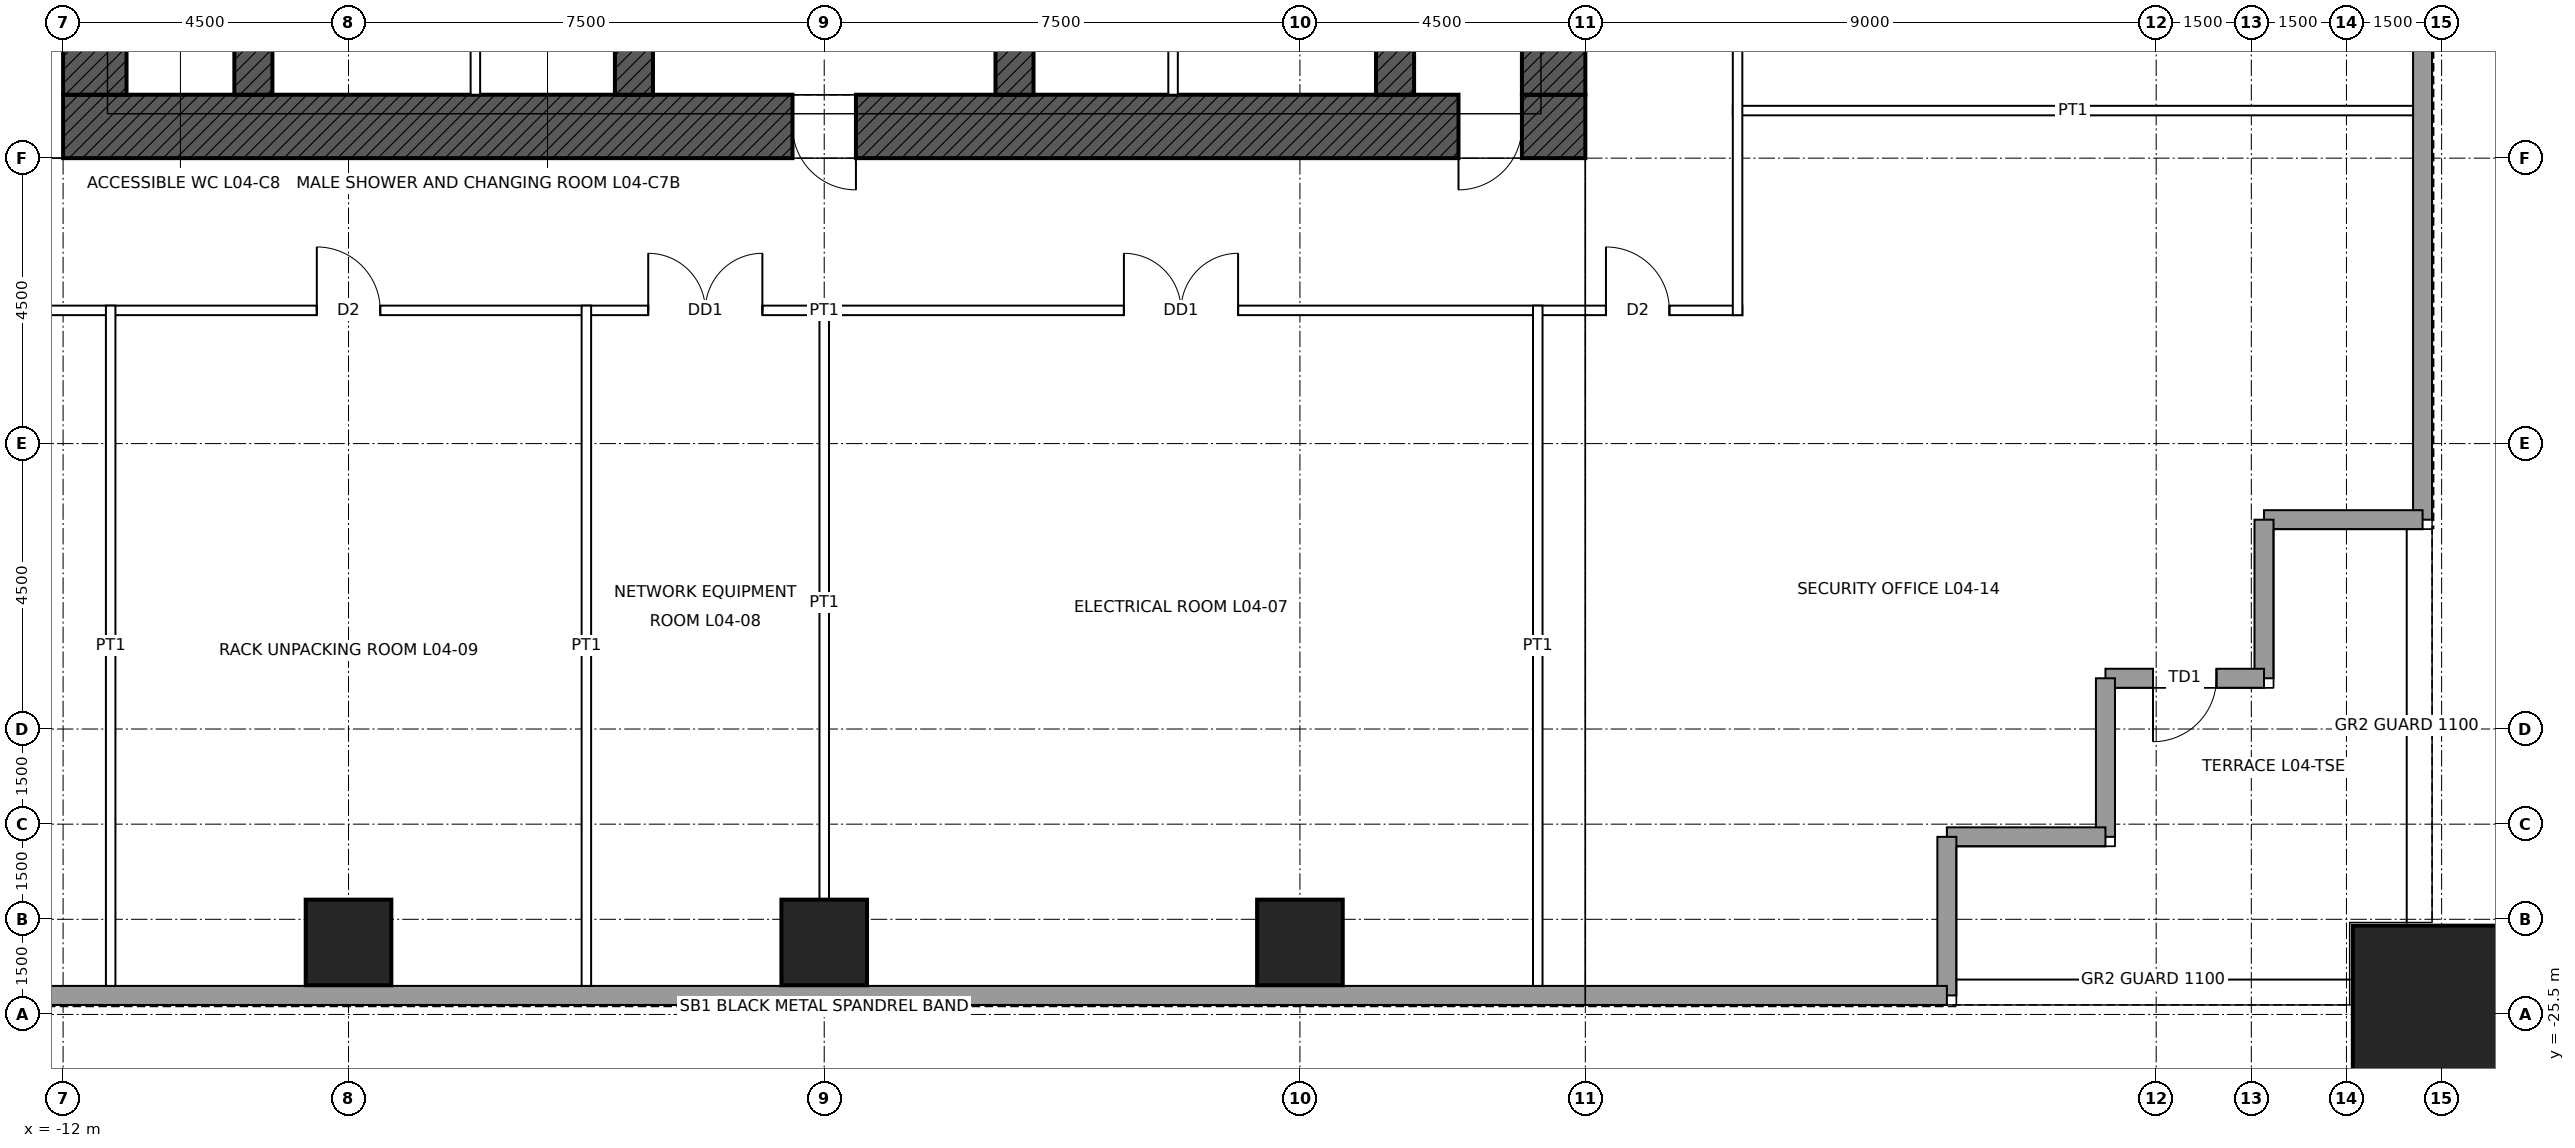
"""IFC4 building model, lengths in metres.
Left out: names, types, materials, properties, quantities, classifications, styles, units other than length and angle.
Written with IfcOpenShell. Run it as: python <this file> out.ifc"""

import sys

from ifc_helpers import new_model, si_unit, direction, frame, frame_2d, origin, origin_2d, place, context, subcontext, project, spatial, rectangle, hollow_rectangle, extrude, element, fill, save


model = new_model("IFC4")
c1 = context("Model", 3, precision=1e-05, world=origin(), true_north=direction((0.0, 1.0)))
c2 = subcontext(c1, "Body", "Model", "MODEL_VIEW")
j1 = project(units=[si_unit("LENGTHUNIT", "METRE"), si_unit("PLANEANGLEUNIT", "RADIAN")], contexts=[c1])
p1 = place(None, origin())
s1 = spatial("IfcSite", under=j1, at=p1, CompositionType="ELEMENT")
p2 = place(p1, origin())
s2 = spatial("IfcBuilding", under=s1, at=p2, CompositionType="ELEMENT")
p3 = place(p2, frame((0.0, 0.0, 23.4)))
s3 = spatial("IfcBuildingStorey", under=s2, at=p3, CompositionType="ELEMENT", Elevation=23.4)
p4 = place(p3, frame((25.5, -25.5, 0.0), z_axis=(0.0, 0.0, 1.0), x_axis=(1.0, 0.0, 0.0)))
e1 = element("IfcColumn", 1, at=p4, inside=s3, PredefinedType="COLUMN", context=c2, shape_type="SweptSolid", body=[
    extrude(hollow_rectangle(XDim=2.8, YDim=2.8, WallThickness=0.14, at=origin_2d()), origin(), (0.0, 0.0, 1.0), 5.0),
])
for number, where, z_axis, x_axis in (
    (2, (7.5, -24.365, 0.0), (0.0, 0.0, 1.0), (1.0, 0.0, 0.0)),
    (3, (0.0, -24.365, 0.0), (0.0, 0.0, 1.0), (1.0, 0.0, 0.0)),
    (4, (-7.5, -24.365, 0.0), (0.0, 0.0, 1.0), (1.0, 0.0, 0.0)),
):
    element("IfcColumn", number, at=place(p3, frame(where, z_axis=z_axis, x_axis=x_axis)), inside=s3, PredefinedType="COLUMN", context=c2, shape_type="SweptSolid", body=[
        extrude(hollow_rectangle(XDim=1.35, YDim=1.35, WallThickness=0.085, at=origin_2d()), origin(), (0.0, 0.0, 1.0), 5.0),
    ])
p5 = place(p3, frame((12.0, -11.5, 0.0), z_axis=(0.0, 0.0, 1.0), x_axis=(-1.0, 0.0, 0.0)))
e5 = element("IfcWall", 5, at=p5, inside=s3, PredefinedType="SHEAR", context=c2, shape_type="SweptSolid", body=[
    extrude(rectangle(XDim=24.0, YDim=1.0, at=frame_2d((12.0, 0.0))), origin(), (0.0, 0.0, 1.0), 5.0),
])
p6 = place(p5, frame((11.5, 0.0, 0.0)))
e6 = element("IfcOpeningElement", 6, at=p6, cuts=e5, PredefinedType="OPENING", context=c2, shape_type="SweptSolid", body=[
    extrude(rectangle(XDim=1.0, YDim=2.1, at=frame_2d((0.5, 1.05))), frame((0.0, 0.51, 0.0), z_axis=(0.0, -1.0, 0.0), x_axis=(1.0, 0.0, 0.0)), (0.0, 0.0, 1.0), 1.02),
])
p7 = place(p5, frame((1.0, 0.0, 0.0)))
e7 = element("IfcOpeningElement", 7, at=p7, cuts=e5, PredefinedType="OPENING", context=c2, shape_type="SweptSolid", body=[
    extrude(rectangle(XDim=1.0, YDim=2.4, at=frame_2d((0.5, 1.2))), frame((0.0, 0.51, 0.0), z_axis=(0.0, -1.0, 0.0), x_axis=(1.0, 0.0, 0.0)), (0.0, 0.0, 1.0), 1.02),
])
p8 = place(p3, frame((11.5, 11.0, 0.0), z_axis=(0.0, 0.0, 1.0), x_axis=(0.0, -1.0, 0.0)))
e8 = element("IfcWall", 8, at=p8, inside=s3, PredefinedType="SHEAR", context=c2, shape_type="SweptSolid", body=[
    extrude(rectangle(XDim=22.0, YDim=1.0, at=frame_2d((11.0, 0.0))), origin(), (0.0, 0.0, 1.0), 5.0),
])
p9 = place(p8, frame((10.5, 0.0, 0.0)))
e9 = element("IfcOpeningElement", 9, at=p9, cuts=e8, PredefinedType="OPENING", context=c2, shape_type="SweptSolid", body=[
    extrude(rectangle(XDim=1.0, YDim=2.4, at=frame_2d((0.5, 1.2))), frame((0.0, 0.51, 0.0), z_axis=(0.0, -1.0, 0.0), x_axis=(1.0, 0.0, 0.0)), (0.0, 0.0, 1.0), 1.02),
])
p10 = place(p3, frame((-11.5, -11.0, 0.0), z_axis=(0.0, 0.0, 1.0), x_axis=(0.0, 1.0, 0.0)))
e10 = element("IfcWall", 10, at=p10, inside=s3, PredefinedType="SHEAR", context=c2, shape_type="SweptSolid", body=[
    extrude(rectangle(XDim=22.0, YDim=1.0, at=frame_2d((11.0, 0.0))), origin(), (0.0, 0.0, 1.0), 5.0),
])
p11 = place(p10, frame((10.5, 0.0, 0.0)))
e11 = element("IfcOpeningElement", 11, at=p11, cuts=e10, PredefinedType="OPENING", context=c2, shape_type="SweptSolid", body=[
    extrude(rectangle(XDim=1.0, YDim=2.4, at=frame_2d((0.5, 1.2))), frame((0.0, 0.51, 0.0), z_axis=(0.0, -1.0, 0.0), x_axis=(1.0, 0.0, 0.0)), (0.0, 0.0, 1.0), 1.02),
])
p12 = place(p3, frame((-9.0, -11.0, 0.0), z_axis=(0.0, 0.0, 1.0), x_axis=(0.0, 1.0, 0.0)))
e12 = element("IfcWall", 12, at=p12, inside=s3, PredefinedType="SHEAR", context=c2, shape_type="SweptSolid", body=[
    extrude(rectangle(XDim=6.5, YDim=0.6, at=frame_2d((3.25, 0.0))), origin(), (0.0, 0.0, 1.0), 5.0),
])
p13 = place(p12, frame((4.25, 0.0, 0.0)))
e13 = element("IfcOpeningElement", 13, at=p13, cuts=e12, PredefinedType="OPENING", context=c2, shape_type="SweptSolid", body=[
    extrude(rectangle(XDim=1.0, YDim=2.1, at=frame_2d((0.5, 1.05))), frame((0.0, 0.31, 0.0), z_axis=(0.0, -1.0, 0.0), x_axis=(1.0, 0.0, 0.0)), (0.0, 0.0, 1.0), 0.62),
])
p14 = place(p3, frame((9.0, -11.0, 0.0), z_axis=(0.0, 0.0, 1.0), x_axis=(0.0, 1.0, 0.0)))
e14 = element("IfcWall", 14, at=p14, inside=s3, PredefinedType="SHEAR", context=c2, shape_type="SweptSolid", body=[
    extrude(rectangle(XDim=6.5, YDim=0.6, at=frame_2d((3.25, 0.0))), origin(), (0.0, 0.0, 1.0), 5.0),
])
p15 = place(p14, frame((4.25, 0.0, 0.0)))
e15 = element("IfcOpeningElement", 15, at=p15, cuts=e14, PredefinedType="OPENING", context=c2, shape_type="SweptSolid", body=[
    extrude(rectangle(XDim=1.0, YDim=2.1, at=frame_2d((0.5, 1.05))), frame((0.0, 0.31, 0.0), z_axis=(0.0, -1.0, 0.0), x_axis=(1.0, 0.0, 0.0)), (0.0, 0.0, 1.0), 0.62),
])
for number, where, z_axis, x_axis in (
    (16, (-3.0, -11.0, 0.0), (0.0, 0.0, 1.0), (0.0, 1.0, 0.0)),
    (17, (3.0, -11.0, 0.0), (0.0, 0.0, 1.0), (0.0, 1.0, 0.0)),
):
    element("IfcWall", number, at=place(p3, frame(where, z_axis=z_axis, x_axis=x_axis)), inside=s3, PredefinedType="SHEAR", context=c2, shape_type="SweptSolid", body=[
        extrude(rectangle(XDim=6.5, YDim=0.6, at=frame_2d((3.25, 0.0))), origin(), (0.0, 0.0, 1.0), 5.0),
    ])
p16 = place(p3, frame((25.2, 17.7, 0.0), z_axis=(0.0, 0.0, 1.0), x_axis=(0.0, -1.0, 0.0)))
e18 = element("IfcWall", 18, at=p16, inside=s3, PredefinedType="SOLIDWALL", context=c2, shape_type="SweptSolid", body=[
    extrude(rectangle(XDim=35.4, YDim=0.3, at=frame_2d((17.7, 0.0))), origin(), (0.0, 0.0, 1.0), 4.8),
])
for number, where, z_axis, x_axis in (
    (19, (25.2, -17.7, 0.0), (0.0, 0.0, 1.0), (-1.0, 0.0, 0.0)),
    (20, (22.7, -17.7, 0.0), (0.0, 0.0, 1.0), (0.0, -1.0, 0.0)),
):
    element("IfcWall", number, at=place(p3, frame(where, z_axis=z_axis, x_axis=x_axis)), inside=s3, PredefinedType="SOLIDWALL", context=c2, shape_type="SweptSolid", body=[
        extrude(rectangle(XDim=2.5, YDim=0.3, at=frame_2d((1.25, 0.0))), origin(), (0.0, 0.0, 1.0), 4.8),
    ])
p17 = place(p3, frame((22.7, -20.2, 0.0), z_axis=(0.0, 0.0, 1.0), x_axis=(-1.0, 0.0, 0.0)))
e21 = element("IfcWall", 21, at=p17, inside=s3, PredefinedType="SOLIDWALL", context=c2, shape_type="SweptSolid", body=[
    extrude(rectangle(XDim=2.5, YDim=0.3, at=frame_2d((1.25, 0.0))), origin(), (0.0, 0.0, 1.0), 4.8),
])
p18 = place(p17, frame((0.75, 0.0, 0.0)))
e22 = element("IfcOpeningElement", 22, at=p18, cuts=e21, PredefinedType="OPENING", context=c2, shape_type="SweptSolid", body=[
    extrude(rectangle(XDim=1.0, YDim=2.4, at=frame_2d((0.5, 1.2))), frame((0.0, 0.16, 0.0), z_axis=(0.0, -1.0, 0.0), x_axis=(1.0, 0.0, 0.0)), (0.0, 0.0, 1.0), 0.32),
])
for number, where, z_axis, x_axis in (
    (23, (20.2, -20.2, 0.0), (0.0, 0.0, 1.0), (0.0, -1.0, 0.0)),
    (24, (20.2, -22.7, 0.0), (0.0, 0.0, 1.0), (-1.0, 0.0, 0.0)),
    (25, (17.7, -22.7, 0.0), (0.0, 0.0, 1.0), (0.0, -1.0, 0.0)),
):
    element("IfcWall", number, at=place(p3, frame(where, z_axis=z_axis, x_axis=x_axis)), inside=s3, PredefinedType="SOLIDWALL", context=c2, shape_type="SweptSolid", body=[
        extrude(rectangle(XDim=2.5, YDim=0.3, at=frame_2d((1.25, 0.0))), origin(), (0.0, 0.0, 1.0), 4.8),
    ])
p19 = place(p3, frame((17.7, -25.2, 0.0), z_axis=(0.0, 0.0, 1.0), x_axis=(-1.0, 0.0, 0.0)))
e26 = element("IfcWall", 26, at=p19, inside=s3, PredefinedType="SOLIDWALL", context=c2, shape_type="SweptSolid", body=[
    extrude(rectangle(XDim=35.4, YDim=0.3, at=frame_2d((17.7, 0.0))), origin(), (0.0, 0.0, 1.0), 4.8),
])
p20 = place(p3, frame((-14.475, -14.4, 0.0), z_axis=(0.0, 0.0, 1.0), x_axis=(1.0, 0.0, 0.0)))
e27 = element("IfcWall", 27, at=p20, inside=s3, PredefinedType="PARTITIONING", context=c2, shape_type="SweptSolid", body=[
    extrude(rectangle(XDim=28.95, YDim=0.15, at=frame_2d((14.475, 0.0))), origin(), (0.0, 0.0, 1.0), 4.8),
])
p21 = place(p20, frame((19.2, 0.0, 0.0)))
e28 = element("IfcOpeningElement", 28, at=p21, cuts=e27, PredefinedType="OPENING", context=c2, shape_type="SweptSolid", body=[
    extrude(rectangle(XDim=1.8, YDim=2.4, at=frame_2d((0.9, 1.2))), frame((0.0, 0.085, 0.0), z_axis=(0.0, -1.0, 0.0), x_axis=(1.0, 0.0, 0.0)), (0.0, 0.0, 1.0), 0.17),
])
p22 = place(p20, frame((11.7, 0.0, 0.0)))
e29 = element("IfcOpeningElement", 29, at=p22, cuts=e27, PredefinedType="OPENING", context=c2, shape_type="SweptSolid", body=[
    extrude(rectangle(XDim=1.8, YDim=2.4, at=frame_2d((0.9, 1.2))), frame((0.0, 0.085, 0.0), z_axis=(0.0, -1.0, 0.0), x_axis=(1.0, 0.0, 0.0)), (0.0, 0.0, 1.0), 0.17),
])
p23 = place(p20, frame((6.475, 0.0, 0.0)))
e30 = element("IfcOpeningElement", 30, at=p23, cuts=e27, PredefinedType="OPENING", context=c2, shape_type="SweptSolid", body=[
    extrude(rectangle(XDim=1.0, YDim=2.1, at=frame_2d((0.5, 1.05))), frame((0.0, 0.085, 0.0), z_axis=(0.0, -1.0, 0.0), x_axis=(1.0, 0.0, 0.0)), (0.0, 0.0, 1.0), 0.17),
])
p24 = place(p20, frame((26.8, 0.0, 0.0)))
e31 = element("IfcOpeningElement", 31, at=p24, cuts=e27, PredefinedType="OPENING", context=c2, shape_type="SweptSolid", body=[
    extrude(rectangle(XDim=1.0, YDim=2.1, at=frame_2d((0.5, 1.05))), frame((0.0, 0.085, 0.0), z_axis=(0.0, -1.0, 0.0), x_axis=(1.0, 0.0, 0.0)), (0.0, 0.0, 1.0), 0.17),
])
p25 = place(p20, frame((1.15, 0.0, 0.0)))
e32 = element("IfcOpeningElement", 32, at=p25, cuts=e27, PredefinedType="OPENING", context=c2, shape_type="SweptSolid", body=[
    extrude(rectangle(XDim=1.0, YDim=2.1, at=frame_2d((0.5, 1.05))), frame((0.0, 0.085, 0.0), z_axis=(0.0, -1.0, 0.0), x_axis=(1.0, 0.0, 0.0)), (0.0, 0.0, 1.0), 0.17),
])
for number, where, z_axis, x_axis in (
    (33, (14.325, -11.25, 0.0), (0.0, 0.0, 1.0), (1.0, 0.0, 0.0)),
    (34, (-11.25, -25.05, 0.0), (0.0, 0.0, 1.0), (0.0, 1.0, 0.0)),
    (35, (-3.75, -25.05, 0.0), (0.0, 0.0, 1.0), (0.0, 1.0, 0.0)),
):
    element("IfcWall", number, at=place(p3, frame(where, z_axis=z_axis, x_axis=x_axis)), inside=s3, PredefinedType="PARTITIONING", context=c2, shape_type="SweptSolid", body=[
        extrude(rectangle(XDim=10.725, YDim=0.15, at=frame_2d((5.363, 0.0))), origin(), (0.0, 0.0, 1.0), 3.853),
    ])
p26 = place(p3, frame((0.0, -23.69, 0.0), z_axis=(0.0, 0.0, 1.0), x_axis=(0.0, 1.0, 0.0)))
e36 = element("IfcWall", 36, at=p26, inside=s3, PredefinedType="PARTITIONING", context=c2, shape_type="SweptSolid", body=[
    extrude(rectangle(XDim=9.365, YDim=0.15, at=frame_2d((4.683, 0.0))), origin(), (0.0, 0.0, 1.0), 3.853),
])
p27 = place(p3, frame((11.25, -25.05, 0.0), z_axis=(0.0, 0.0, 1.0), x_axis=(0.0, 1.0, 0.0)))
e37 = element("IfcWall", 37, at=p27, inside=s3, PredefinedType="PARTITIONING", context=c2, shape_type="SweptSolid", body=[
    extrude(rectangle(XDim=10.725, YDim=0.15, at=frame_2d((5.363, 0.0))), origin(), (0.0, 0.0, 1.0), 3.853),
])
p28 = place(p3, frame((14.4, -14.475, 0.0), z_axis=(0.0, 0.0, 1.0), x_axis=(0.0, 1.0, 0.0)))
e38 = element("IfcWall", 38, at=p28, inside=s3, PredefinedType="PARTITIONING", context=c2, shape_type="SweptSolid", body=[
    extrude(rectangle(XDim=28.95, YDim=0.15, at=frame_2d((14.475, 0.0))), origin(), (0.0, 0.0, 1.0), 4.8),
])
p29 = place(p28, frame((23.35, 0.0, 0.0)))
e39 = element("IfcOpeningElement", 39, at=p29, cuts=e38, PredefinedType="OPENING", context=c2, shape_type="SweptSolid", body=[
    extrude(rectangle(XDim=1.0, YDim=2.1, at=frame_2d((0.5, 1.05))), frame((0.0, 0.085, 0.0), z_axis=(0.0, -1.0, 0.0), x_axis=(1.0, 0.0, 0.0)), (0.0, 0.0, 1.0), 0.17),
])
p30 = place(p28, frame((11.7, 0.0, 0.0)))
e40 = element("IfcOpeningElement", 40, at=p30, cuts=e38, PredefinedType="OPENING", context=c2, shape_type="SweptSolid", body=[
    extrude(rectangle(XDim=1.8, YDim=2.4, at=frame_2d((0.9, 1.2))), frame((0.0, 0.085, 0.0), z_axis=(0.0, -1.0, 0.0), x_axis=(1.0, 0.0, 0.0)), (0.0, 0.0, 1.0), 0.17),
])
p31 = place(p3, frame((-5.5, -11.0, 0.0), z_axis=(0.0, 0.0, 1.0), x_axis=(0.0, 1.0, 0.0)))
e41 = element("IfcWall", 41, at=p31, inside=s3, PredefinedType="PARTITIONING", context=c2, shape_type="SweptSolid", body=[
    extrude(rectangle(XDim=6.2, YDim=0.15, at=frame_2d((3.1, 0.0))), origin(), (0.0, 0.0, 1.0), 4.75),
])
p32 = place(p31, frame((2.6, 0.0, 0.0)))
e42 = element("IfcOpeningElement", 42, at=p32, cuts=e41, PredefinedType="OPENING", context=c2, shape_type="SweptSolid", body=[
    extrude(rectangle(XDim=1.0, YDim=2.1, at=frame_2d((0.5, 1.05))), frame((0.0, 0.085, 0.0), z_axis=(0.0, -1.0, 0.0), x_axis=(1.0, 0.0, 0.0)), (0.0, 0.0, 1.0), 0.17),
])
p33 = place(p3, frame((5.5, -11.0, 0.0), z_axis=(0.0, 0.0, 1.0), x_axis=(0.0, 1.0, 0.0)))
e43 = element("IfcWall", 43, at=p33, inside=s3, PredefinedType="PARTITIONING", context=c2, shape_type="SweptSolid", body=[
    extrude(rectangle(XDim=6.2, YDim=0.15, at=frame_2d((3.1, 0.0))), origin(), (0.0, 0.0, 1.0), 4.75),
])
p34 = place(p33, frame((2.6, 0.0, 0.0)))
e44 = element("IfcOpeningElement", 44, at=p34, cuts=e43, PredefinedType="OPENING", context=c2, shape_type="SweptSolid", body=[
    extrude(rectangle(XDim=1.0, YDim=2.1, at=frame_2d((0.5, 1.05))), frame((0.0, 0.085, 0.0), z_axis=(0.0, -1.0, 0.0), x_axis=(1.0, 0.0, 0.0)), (0.0, 0.0, 1.0), 0.17),
])
p35 = place(p18, origin())
e45 = element("IfcDoor", 45, at=p35, inside=s3, OperationType="SINGLE_SWING_RIGHT", PredefinedType="DOOR", context=c2, shape_type="SweptSolid", body=[
    extrude(rectangle(XDim=1.0, YDim=2.4, at=frame_2d((0.5, 1.2))), frame((0.0, 0.025, 0.0), z_axis=(0.0, -1.0, 0.0), x_axis=(1.0, 0.0, 0.0)), (0.0, 0.0, 1.0), 0.05),
])
fill(e22, e45)
p36 = place(p6, origin())
e46 = element("IfcDoor", 46, at=p36, inside=s3, OperationType="SINGLE_SWING_LEFT", PredefinedType="DOOR", context=c2, shape_type="SweptSolid", body=[
    extrude(rectangle(XDim=1.0, YDim=2.1, at=frame_2d((0.5, 1.05))), frame((0.0, 0.485, 0.0), z_axis=(0.0, -1.0, 0.0), x_axis=(1.0, 0.0, 0.0)), (0.0, 0.0, 1.0), 0.05),
])
fill(e6, e46)
p37 = place(p7, origin())
e47 = element("IfcDoor", 47, at=p37, inside=s3, OperationType="SINGLE_SWING_RIGHT", PredefinedType="DOOR", context=c2, shape_type="SweptSolid", body=[
    extrude(rectangle(XDim=1.0, YDim=2.4, at=frame_2d((0.5, 1.2))), frame((0.0, 0.485, 0.0), z_axis=(0.0, -1.0, 0.0), x_axis=(1.0, 0.0, 0.0)), (0.0, 0.0, 1.0), 0.05),
])
fill(e7, e47)
p38 = place(p21, origin())
e48 = element("IfcDoor", 48, at=p38, inside=s3, OperationType="DOUBLE_DOOR_SINGLE_SWING", PredefinedType="DOOR", context=c2, shape_type="SweptSolid", body=[
    extrude(rectangle(XDim=1.8, YDim=2.4, at=frame_2d((0.9, 1.2))), frame((0.0, 0.025, 0.0), z_axis=(0.0, -1.0, 0.0), x_axis=(1.0, 0.0, 0.0)), (0.0, 0.0, 1.0), 0.05),
])
fill(e28, e48)
p39 = place(p22, origin())
e49 = element("IfcDoor", 49, at=p39, inside=s3, OperationType="DOUBLE_DOOR_SINGLE_SWING", PredefinedType="DOOR", context=c2, shape_type="SweptSolid", body=[
    extrude(rectangle(XDim=1.8, YDim=2.4, at=frame_2d((0.9, 1.2))), frame((0.0, 0.025, 0.0), z_axis=(0.0, -1.0, 0.0), x_axis=(1.0, 0.0, 0.0)), (0.0, 0.0, 1.0), 0.05),
])
fill(e29, e49)
p40 = place(p23, origin())
e50 = element("IfcDoor", 50, at=p40, inside=s3, OperationType="SINGLE_SWING_LEFT", PredefinedType="DOOR", context=c2, shape_type="SweptSolid", body=[
    extrude(rectangle(XDim=1.0, YDim=2.1, at=frame_2d((0.5, 1.05))), frame((0.0, 0.025, 0.0), z_axis=(0.0, -1.0, 0.0), x_axis=(1.0, 0.0, 0.0)), (0.0, 0.0, 1.0), 0.05),
])
fill(e30, e50)
p41 = place(p24, origin())
e51 = element("IfcDoor", 51, at=p41, inside=s3, OperationType="SINGLE_SWING_LEFT", PredefinedType="DOOR", context=c2, shape_type="SweptSolid", body=[
    extrude(rectangle(XDim=1.0, YDim=2.1, at=frame_2d((0.5, 1.05))), frame((0.0, 0.025, 0.0), z_axis=(0.0, -1.0, 0.0), x_axis=(1.0, 0.0, 0.0)), (0.0, 0.0, 1.0), 0.05),
])
fill(e31, e51)
save(model, sys.argv[1])
